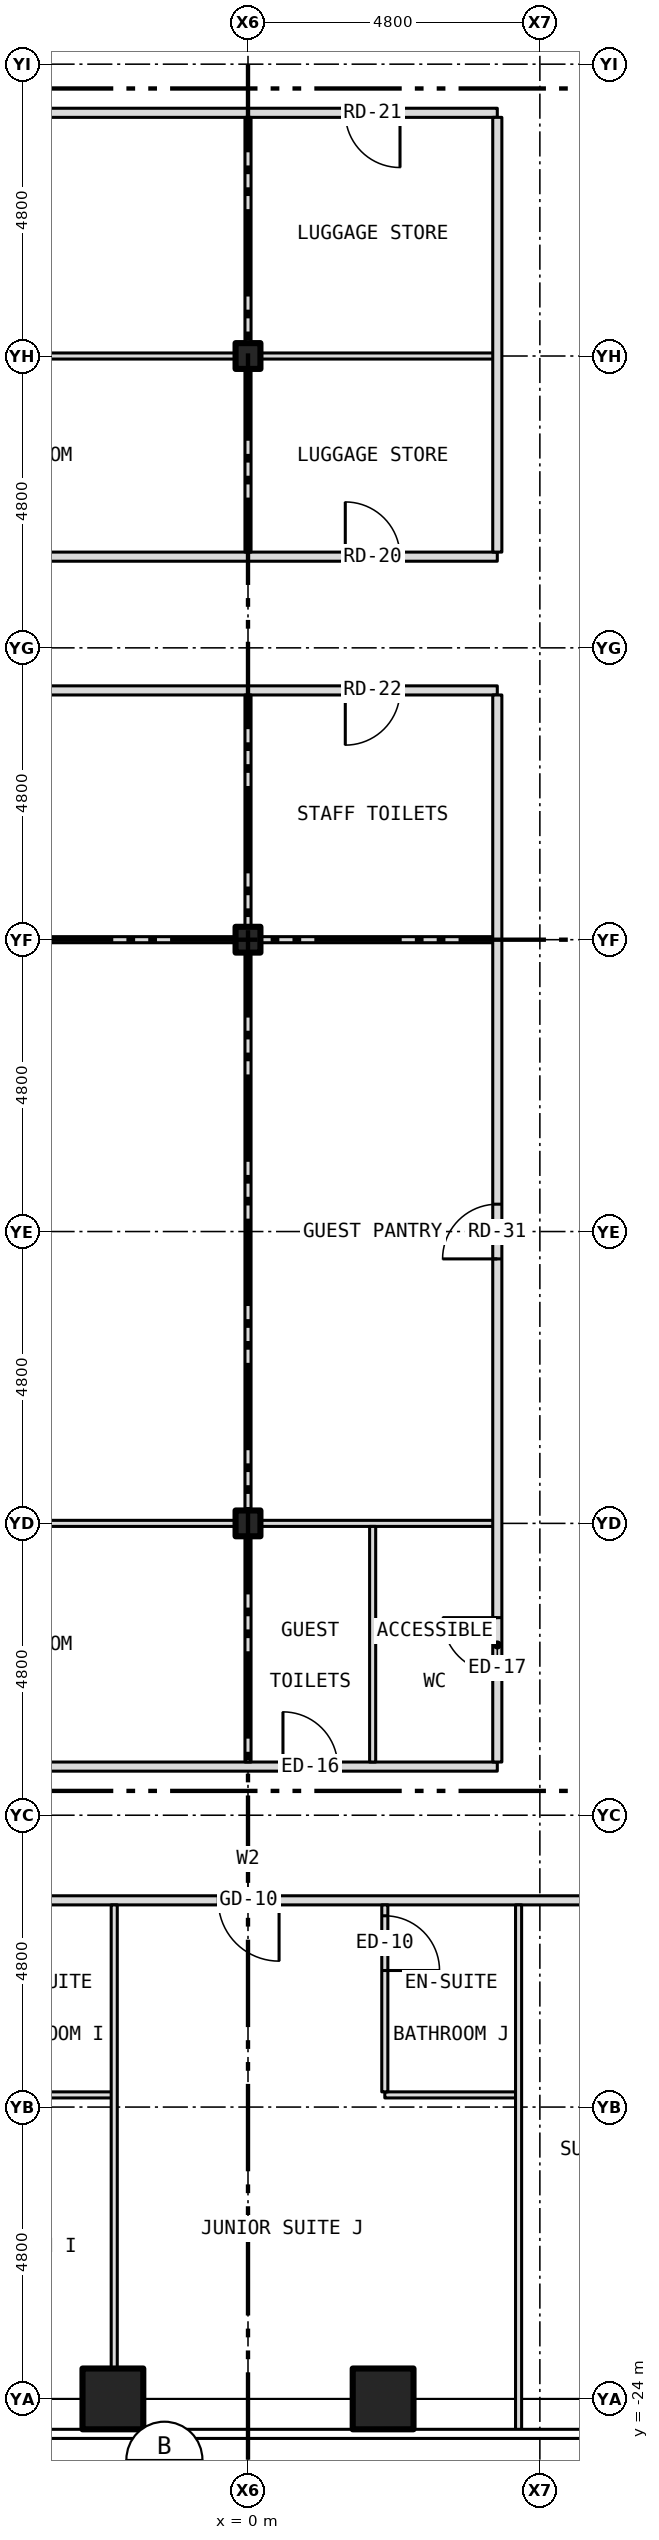
"""IFC4 building model, lengths in metres.
Left out: names, types, materials, properties, quantities, classifications, styles, units other than length and angle.
Written with IfcOpenShell. Run it as: python <this file> out.ifc"""

import sys

from ifc_helpers import new_model, si_unit, direction, frame, frame_2d, origin, origin_2d, place, context, subcontext, project, spatial, rectangle, hollow_rectangle, i_section, extrude, element, fill, save


model = new_model("IFC4")
c1 = context("Model", 3, precision=1e-05, world=origin(), true_north=direction((0.0, 1.0)))
c2 = subcontext(c1, "Body", "Model", "MODEL_VIEW")
j1 = project(units=[si_unit("LENGTHUNIT", "METRE"), si_unit("PLANEANGLEUNIT", "RADIAN")], contexts=[c1])
p1 = place(None, origin())
s1 = spatial("IfcSite", under=j1, at=p1, CompositionType="ELEMENT")
p2 = place(p1, origin())
s2 = spatial("IfcBuilding", under=s1, at=p2, CompositionType="ELEMENT")
p3 = place(p2, frame((0.0, 0.0, 49.5)))
s3 = spatial("IfcBuildingStorey", under=s2, at=p3, CompositionType="ELEMENT", Elevation=49.5)
for number, where, z_axis, x_axis in (
    (1, (-2.222, -24.0, -0.15), (0.0, 0.0, 1.0), (1.0, 0.0, 0.0)),
    (2, (2.222, -24.0, -0.15), (0.0, 0.0, 1.0), (1.0, 0.0, 0.0)),
):
    element("IfcColumn", number, at=place(p3, frame(where, z_axis=z_axis, x_axis=x_axis)), inside=s3, PredefinedType="COLUMN", context=c2, shape_type="SweptSolid", body=[
        extrude(hollow_rectangle(XDim=1.0, YDim=1.0, WallThickness=0.06, at=origin_2d()), origin(), (0.0, 0.0, 1.0), 3.5),
    ])
for number, where, z_axis, x_axis in (
    (3, (0.0, -9.6, -0.15), (0.0, 0.0, 1.0), (1.0, 0.0, 0.0)),
    (4, (0.0, 0.0, -0.15), (0.0, 0.0, 1.0), (1.0, 0.0, 0.0)),
    (5, (0.0, 9.6, -0.15), (0.0, 0.0, 1.0), (1.0, 0.0, 0.0)),
):
    element("IfcColumn", number, at=place(p3, frame(where, z_axis=z_axis, x_axis=x_axis)), inside=s3, PredefinedType="COLUMN", context=c2, shape_type="SweptSolid", body=[
        extrude(i_section(OverallWidth=0.409, OverallDepth=0.424, WebThickness=0.033, FlangeThickness=0.052, at=origin_2d()), origin(), (0.0, 0.0, 1.0), 3.5),
    ])
for number, where, z_axis, x_axis in (
    (6, (-4.4, -19.0, 0.0), (0.0, 0.0, 1.0), (1.0, 0.0, 0.0)),
    (7, (2.25, -19.0, 0.0), (0.0, 0.0, 1.0), (1.0, 0.0, 0.0)),
):
    element("IfcWall", number, at=place(p3, frame(where, z_axis=z_axis, x_axis=x_axis)), inside=s3, PredefinedType="PARTITIONING", context=c2, shape_type="SweptSolid", body=[
        extrude(rectangle(XDim=2.2, YDim=0.1, at=frame_2d((1.1, 0.0))), origin(), (0.0, 0.0, 1.0), 3.35),
    ])
p4 = place(p3, frame((-15.8, -15.8, 0.0), z_axis=(0.0, 0.0, 1.0), x_axis=(1.0, 0.0, 0.0)))
e8 = element("IfcWall", 8, at=p4, inside=s3, PredefinedType="PARTITIONING", context=c2, shape_type="SweptSolid", body=[
    extrude(rectangle(XDim=31.6, YDim=0.15, at=frame_2d((15.8, 0.0))), origin(), (0.0, 0.0, 1.0), 3.35),
])
p5 = place(p4, frame((3.067, 0.0, 0.0)))
e9 = element("IfcOpeningElement", 9, at=p5, cuts=e8, PredefinedType="OPENING", context=c2, shape_type="SweptSolid", body=[
    extrude(rectangle(XDim=1.0, YDim=2.1, at=frame_2d((0.5, 1.05))), frame((0.0, 0.087, 0.0), z_axis=(0.0, -1.0, 0.0), x_axis=(1.0, 0.0, 0.0)), (0.0, 0.0, 1.0), 0.174),
])
p6 = place(p4, frame((5.311, 0.0, 0.0)))
e10 = element("IfcOpeningElement", 10, at=p6, cuts=e8, PredefinedType="OPENING", context=c2, shape_type="SweptSolid", body=[
    extrude(rectangle(XDim=1.0, YDim=2.1, at=frame_2d((0.5, 1.05))), frame((0.0, 0.087, 0.0), z_axis=(0.0, -1.0, 0.0), x_axis=(1.0, 0.0, 0.0)), (0.0, 0.0, 1.0), 0.174),
])
p7 = place(p4, frame((9.756, 0.0, 0.0)))
e11 = element("IfcOpeningElement", 11, at=p7, cuts=e8, PredefinedType="OPENING", context=c2, shape_type="SweptSolid", body=[
    extrude(rectangle(XDim=1.0, YDim=2.1, at=frame_2d((0.5, 1.05))), frame((0.0, 0.087, 0.0), z_axis=(0.0, -1.0, 0.0), x_axis=(1.0, 0.0, 0.0)), (0.0, 0.0, 1.0), 0.174),
])
p8 = place(p4, frame((15.311, 0.0, 0.0)))
e12 = element("IfcOpeningElement", 12, at=p8, cuts=e8, PredefinedType="OPENING", context=c2, shape_type="SweptSolid", body=[
    extrude(rectangle(XDim=1.0, YDim=2.1, at=frame_2d((0.5, 1.05))), frame((0.0, 0.087, 0.0), z_axis=(0.0, -1.0, 0.0), x_axis=(1.0, 0.0, 0.0)), (0.0, 0.0, 1.0), 0.174),
])
p9 = place(p4, frame((22.245, 0.0, 0.0)))
e13 = element("IfcOpeningElement", 13, at=p9, cuts=e8, PredefinedType="OPENING", context=c2, shape_type="SweptSolid", body=[
    extrude(rectangle(XDim=1.0, YDim=2.1, at=frame_2d((0.5, 1.05))), frame((0.0, 0.087, 0.0), z_axis=(0.0, -1.0, 0.0), x_axis=(1.0, 0.0, 0.0)), (0.0, 0.0, 1.0), 0.174),
])
p10 = place(p3, frame((-12.8, -13.6, 0.0), z_axis=(0.0, 0.0, 1.0), x_axis=(1.0, 0.0, 0.0)))
e14 = element("IfcWall", 14, at=p10, inside=s3, PredefinedType="PARTITIONING", context=c2, shape_type="SweptSolid", body=[
    extrude(rectangle(XDim=16.9, YDim=0.15, at=frame_2d((8.45, 0.0))), origin(), (0.0, 0.0, 1.0), 3.35),
])
p11 = place(p10, frame((1.15, 0.0, 0.0)))
e15 = element("IfcOpeningElement", 15, at=p11, cuts=e14, PredefinedType="OPENING", context=c2, shape_type="SweptSolid", body=[
    extrude(rectangle(XDim=0.9, YDim=2.1, at=frame_2d((0.45, 1.05))), frame((0.0, 0.087, 0.0), z_axis=(0.0, -1.0, 0.0), x_axis=(1.0, 0.0, 0.0)), (0.0, 0.0, 1.0), 0.174),
])
p12 = place(p10, frame((13.375, 0.0, 0.0)))
e16 = element("IfcOpeningElement", 16, at=p12, cuts=e14, PredefinedType="OPENING", context=c2, shape_type="SweptSolid", body=[
    extrude(rectangle(XDim=0.9, YDim=2.1, at=frame_2d((0.45, 1.05))), frame((0.0, 0.087, 0.0), z_axis=(0.0, -1.0, 0.0), x_axis=(1.0, 0.0, 0.0)), (0.0, 0.0, 1.0), 0.174),
])
p13 = place(p10, frame((7.55, 0.0, 0.0)))
e17 = element("IfcOpeningElement", 17, at=p13, cuts=e14, PredefinedType="OPENING", context=c2, shape_type="SweptSolid", body=[
    extrude(rectangle(XDim=0.9, YDim=2.1, at=frame_2d((0.45, 1.05))), frame((0.0, 0.087, 0.0), z_axis=(0.0, -1.0, 0.0), x_axis=(1.0, 0.0, 0.0)), (0.0, 0.0, 1.0), 0.174),
])
p14 = place(p3, frame((-9.396, -9.6, 0.0), z_axis=(0.0, 0.0, 1.0), x_axis=(1.0, 0.0, 0.0)))
e18 = element("IfcWall", 18, at=p14, inside=s3, PredefinedType="PARTITIONING", context=c2, shape_type="SweptSolid", body=[
    extrude(rectangle(XDim=9.192, YDim=0.1, at=frame_2d((4.596, 0.0))), origin(), (0.0, 0.0, 1.0), 2.728),
])
p15 = place(p3, frame((-0.204, -9.6, 0.0), z_axis=(0.0, 0.0, 1.0), x_axis=(1.0, 0.0, 0.0)))
e19 = element("IfcWall", 19, at=p15, inside=s3, PredefinedType="PARTITIONING", context=c2, shape_type="SweptSolid", body=[
    extrude(rectangle(XDim=0.408, YDim=0.1, at=frame_2d((0.204, 0.0))), origin(), (0.0, 0.0, 1.0), 3.35),
])
p16 = place(p3, frame((0.204, -9.6, 0.0), z_axis=(0.0, 0.0, 1.0), x_axis=(1.0, 0.0, 0.0)))
e20 = element("IfcWall", 20, at=p16, inside=s3, PredefinedType="PARTITIONING", context=c2, shape_type="SweptSolid", body=[
    extrude(rectangle(XDim=3.896, YDim=0.1, at=frame_2d((1.948, 0.0))), origin(), (0.0, 0.0, 1.0), 2.728),
])
p17 = place(p3, frame((-9.396, 0.0, 0.0), z_axis=(0.0, 0.0, 1.0), x_axis=(1.0, 0.0, 0.0)))
e21 = element("IfcWall", 21, at=p17, inside=s3, PredefinedType="PARTITIONING", context=c2, shape_type="SweptSolid", body=[
    extrude(rectangle(XDim=9.192, YDim=0.1, at=frame_2d((4.596, 0.0))), origin(), (0.0, 0.0, 1.0), 2.728),
])
p18 = place(p3, frame((-0.204, 0.0, 0.0), z_axis=(0.0, 0.0, 1.0), x_axis=(1.0, 0.0, 0.0)))
e22 = element("IfcWall", 22, at=p18, inside=s3, PredefinedType="PARTITIONING", context=c2, shape_type="SweptSolid", body=[
    extrude(rectangle(XDim=0.408, YDim=0.1, at=frame_2d((0.204, 0.0))), origin(), (0.0, 0.0, 1.0), 3.35),
])
p19 = place(p3, frame((0.204, 0.0, 0.0), z_axis=(0.0, 0.0, 1.0), x_axis=(1.0, 0.0, 0.0)))
e23 = element("IfcWall", 23, at=p19, inside=s3, PredefinedType="PARTITIONING", context=c2, shape_type="SweptSolid", body=[
    extrude(rectangle(XDim=3.896, YDim=0.1, at=frame_2d((1.948, 0.0))), origin(), (0.0, 0.0, 1.0), 2.728),
])
p20 = place(p3, frame((-12.8, 4.1, 0.0), z_axis=(0.0, 0.0, 1.0), x_axis=(1.0, 0.0, 0.0)))
e24 = element("IfcWall", 24, at=p20, inside=s3, PredefinedType="PARTITIONING", context=c2, shape_type="SweptSolid", body=[
    extrude(rectangle(XDim=16.9, YDim=0.15, at=frame_2d((8.45, 0.0))), origin(), (0.0, 0.0, 1.0), 3.35),
])
p21 = place(p20, frame((1.15, 0.0, 0.0)))
e25 = element("IfcOpeningElement", 25, at=p21, cuts=e24, PredefinedType="OPENING", context=c2, shape_type="SweptSolid", body=[
    extrude(rectangle(XDim=0.9, YDim=2.1, at=frame_2d((0.45, 1.05))), frame((0.0, 0.087, 0.0), z_axis=(0.0, -1.0, 0.0), x_axis=(1.0, 0.0, 0.0)), (0.0, 0.0, 1.0), 0.174),
])
p22 = place(p20, frame((14.4, 0.0, 0.0)))
e26 = element("IfcOpeningElement", 26, at=p22, cuts=e24, PredefinedType="OPENING", context=c2, shape_type="SweptSolid", body=[
    extrude(rectangle(XDim=0.9, YDim=2.1, at=frame_2d((0.45, 1.05))), frame((0.0, 0.087, 0.0), z_axis=(0.0, -1.0, 0.0), x_axis=(1.0, 0.0, 0.0)), (0.0, 0.0, 1.0), 0.174),
])
p23 = place(p20, frame((7.55, 0.0, 0.0)))
e27 = element("IfcOpeningElement", 27, at=p23, cuts=e24, PredefinedType="OPENING", context=c2, shape_type="SweptSolid", body=[
    extrude(rectangle(XDim=0.9, YDim=2.1, at=frame_2d((0.45, 1.05))), frame((0.0, 0.087, 0.0), z_axis=(0.0, -1.0, 0.0), x_axis=(1.0, 0.0, 0.0)), (0.0, 0.0, 1.0), 0.174),
])
p24 = place(p3, frame((-12.8, 6.3, 0.0), z_axis=(0.0, 0.0, 1.0), x_axis=(1.0, 0.0, 0.0)))
e28 = element("IfcWall", 28, at=p24, inside=s3, PredefinedType="PARTITIONING", context=c2, shape_type="SweptSolid", body=[
    extrude(rectangle(XDim=16.9, YDim=0.15, at=frame_2d((8.45, 0.0))), origin(), (0.0, 0.0, 1.0), 3.35),
])
p25 = place(p24, frame((14.4, 0.0, 0.0)))
e29 = element("IfcOpeningElement", 29, at=p25, cuts=e28, PredefinedType="OPENING", context=c2, shape_type="SweptSolid", body=[
    extrude(rectangle(XDim=0.9, YDim=2.1, at=frame_2d((0.45, 1.05))), frame((0.0, 0.087, 0.0), z_axis=(0.0, -1.0, 0.0), x_axis=(1.0, 0.0, 0.0)), (0.0, 0.0, 1.0), 0.174),
])
p26 = place(p24, frame((7.55, 0.0, 0.0)))
e30 = element("IfcOpeningElement", 30, at=p26, cuts=e28, PredefinedType="OPENING", context=c2, shape_type="SweptSolid", body=[
    extrude(rectangle(XDim=0.9, YDim=2.1, at=frame_2d((0.45, 1.05))), frame((0.0, 0.087, 0.0), z_axis=(0.0, -1.0, 0.0), x_axis=(1.0, 0.0, 0.0)), (0.0, 0.0, 1.0), 0.174),
])
p27 = place(p3, frame((-9.396, 9.6, 0.0), z_axis=(0.0, 0.0, 1.0), x_axis=(1.0, 0.0, 0.0)))
e31 = element("IfcWall", 31, at=p27, inside=s3, PredefinedType="PARTITIONING", context=c2, shape_type="SweptSolid", body=[
    extrude(rectangle(XDim=9.192, YDim=0.1, at=frame_2d((4.596, 0.0))), origin(), (0.0, 0.0, 1.0), 2.728),
])
p28 = place(p3, frame((-0.204, 9.6, 0.0), z_axis=(0.0, 0.0, 1.0), x_axis=(1.0, 0.0, 0.0)))
e32 = element("IfcWall", 32, at=p28, inside=s3, PredefinedType="PARTITIONING", context=c2, shape_type="SweptSolid", body=[
    extrude(rectangle(XDim=0.408, YDim=0.1, at=frame_2d((0.204, 0.0))), origin(), (0.0, 0.0, 1.0), 3.35),
])
p29 = place(p3, frame((0.204, 9.6, 0.0), z_axis=(0.0, 0.0, 1.0), x_axis=(1.0, 0.0, 0.0)))
e33 = element("IfcWall", 33, at=p29, inside=s3, PredefinedType="PARTITIONING", context=c2, shape_type="SweptSolid", body=[
    extrude(rectangle(XDim=3.896, YDim=0.1, at=frame_2d((1.948, 0.0))), origin(), (0.0, 0.0, 1.0), 2.728),
])
p30 = place(p3, frame((-12.8, 13.6, 0.0), z_axis=(0.0, 0.0, 1.0), x_axis=(1.0, 0.0, 0.0)))
e34 = element("IfcWall", 34, at=p30, inside=s3, PredefinedType="PARTITIONING", context=c2, shape_type="SweptSolid", body=[
    extrude(rectangle(XDim=16.9, YDim=0.15, at=frame_2d((8.45, 0.0))), origin(), (0.0, 0.0, 1.0), 3.35),
])
p31 = place(p30, frame((1.15, 0.0, 0.0)))
e35 = element("IfcOpeningElement", 35, at=p31, cuts=e34, PredefinedType="OPENING", context=c2, shape_type="SweptSolid", body=[
    extrude(rectangle(XDim=0.9, YDim=2.1, at=frame_2d((0.45, 1.05))), frame((0.0, 0.087, 0.0), z_axis=(0.0, -1.0, 0.0), x_axis=(1.0, 0.0, 0.0)), (0.0, 0.0, 1.0), 0.174),
])
p32 = place(p30, frame((14.4, 0.0, 0.0)))
e36 = element("IfcOpeningElement", 36, at=p32, cuts=e34, PredefinedType="OPENING", context=c2, shape_type="SweptSolid", body=[
    extrude(rectangle(XDim=0.9, YDim=2.1, at=frame_2d((0.45, 1.05))), frame((0.0, 0.087, 0.0), z_axis=(0.0, -1.0, 0.0), x_axis=(1.0, 0.0, 0.0)), (0.0, 0.0, 1.0), 0.174),
])
p33 = place(p30, frame((7.55, 0.0, 0.0)))
e37 = element("IfcOpeningElement", 37, at=p33, cuts=e34, PredefinedType="OPENING", context=c2, shape_type="SweptSolid", body=[
    extrude(rectangle(XDim=0.9, YDim=2.1, at=frame_2d((0.45, 1.05))), frame((0.0, 0.087, 0.0), z_axis=(0.0, -1.0, 0.0), x_axis=(1.0, 0.0, 0.0)), (0.0, 0.0, 1.0), 0.174),
])
p34 = place(p3, frame((-2.2, -23.88, 0.0), z_axis=(0.0, 0.0, 1.0), x_axis=(0.0, 1.0, 0.0)))
e38 = element("IfcWall", 38, at=p34, inside=s3, PredefinedType="PARTITIONING", context=c2, shape_type="SweptSolid", body=[
    extrude(rectangle(XDim=8.005, YDim=0.1, at=frame_2d((4.002, 0.0))), origin(), (0.0, 0.0, 1.0), 3.35),
])
p35 = place(p3, frame((0.0, -13.525, 0.0), z_axis=(0.0, 0.0, 1.0), x_axis=(0.0, 1.0, 0.0)))
e39 = element("IfcWall", 39, at=p35, inside=s3, PredefinedType="PARTITIONING", context=c2, shape_type="SweptSolid", body=[
    extrude(rectangle(XDim=3.875, YDim=0.1, at=frame_2d((1.938, 0.0))), origin(), (0.0, 0.0, 1.0), 2.728),
])
p36 = place(p3, frame((0.0, -9.55, 0.0), z_axis=(0.0, 0.0, 1.0), x_axis=(0.0, 1.0, 0.0)))
e40 = element("IfcWall", 40, at=p36, inside=s3, PredefinedType="PARTITIONING", context=c2, shape_type="SweptSolid", body=[
    extrude(rectangle(XDim=9.5, YDim=0.1, at=frame_2d((4.75, 0.0))), origin(), (0.0, 0.0, 1.0), 2.728),
])
p37 = place(p3, frame((0.0, 0.05, 0.0), z_axis=(0.0, 0.0, 1.0), x_axis=(0.0, 1.0, 0.0)))
e41 = element("IfcWall", 41, at=p37, inside=s3, PredefinedType="PARTITIONING", context=c2, shape_type="SweptSolid", body=[
    extrude(rectangle(XDim=3.975, YDim=0.1, at=frame_2d((1.987, 0.0))), origin(), (0.0, 0.0, 1.0), 2.728),
])
p38 = place(p3, frame((0.0, 6.375, 0.0), z_axis=(0.0, 0.0, 1.0), x_axis=(0.0, 1.0, 0.0)))
e42 = element("IfcWall", 42, at=p38, inside=s3, PredefinedType="PARTITIONING", context=c2, shape_type="SweptSolid", body=[
    extrude(rectangle(XDim=3.175, YDim=0.1, at=frame_2d((1.587, 0.0))), origin(), (0.0, 0.0, 1.0), 2.728),
])
p39 = place(p3, frame((0.0, 9.65, 0.0), z_axis=(0.0, 0.0, 1.0), x_axis=(0.0, 1.0, 0.0)))
e43 = element("IfcWall", 43, at=p39, inside=s3, PredefinedType="PARTITIONING", context=c2, shape_type="SweptSolid", body=[
    extrude(rectangle(XDim=3.875, YDim=0.1, at=frame_2d((1.938, 0.0))), origin(), (0.0, 0.0, 1.0), 2.728),
])
p40 = place(p3, frame((2.05, -13.525, 0.0), z_axis=(0.0, 0.0, 1.0), x_axis=(0.0, 1.0, 0.0)))
e44 = element("IfcWall", 44, at=p40, inside=s3, PredefinedType="PARTITIONING", context=c2, shape_type="SweptSolid", body=[
    extrude(rectangle(XDim=3.875, YDim=0.1, at=frame_2d((1.938, 0.0))), origin(), (0.0, 0.0, 1.0), 3.35),
])
p41 = place(p3, frame((2.25, -18.95, 0.0), z_axis=(0.0, 0.0, 1.0), x_axis=(0.0, 1.0, 0.0)))
e45 = element("IfcWall", 45, at=p41, inside=s3, PredefinedType="PARTITIONING", context=c2, shape_type="SweptSolid", body=[
    extrude(rectangle(XDim=3.075, YDim=0.1, at=frame_2d((1.538, 0.0))), origin(), (0.0, 0.0, 1.0), 3.35),
])
p42 = place(p41, frame((1.996, 0.0, 0.0)))
e46 = element("IfcOpeningElement", 46, at=p42, cuts=e45, PredefinedType="OPENING", context=c2, shape_type="SweptSolid", body=[
    extrude(rectangle(XDim=0.9, YDim=2.1, at=frame_2d((0.45, 1.05))), frame((0.0, 0.062, 0.0), z_axis=(0.0, -1.0, 0.0), x_axis=(1.0, 0.0, 0.0)), (0.0, 0.0, 1.0), 0.124),
])
p43 = place(p3, frame((4.1, -13.525, 0.0), z_axis=(0.0, 0.0, 1.0), x_axis=(0.0, 1.0, 0.0)))
e47 = element("IfcWall", 47, at=p43, inside=s3, PredefinedType="PARTITIONING", context=c2, shape_type="SweptSolid", body=[
    extrude(rectangle(XDim=17.55, YDim=0.15, at=frame_2d((8.775, 0.0))), origin(), (0.0, 0.0, 1.0), 3.35),
])
p44 = place(p43, frame((1.475, 0.0, 0.0)))
e48 = element("IfcOpeningElement", 48, at=p44, cuts=e47, PredefinedType="OPENING", context=c2, shape_type="SweptSolid", body=[
    extrude(rectangle(XDim=0.9, YDim=2.1, at=frame_2d((0.45, 1.05))), frame((0.0, 0.087, 0.0), z_axis=(0.0, -1.0, 0.0), x_axis=(1.0, 0.0, 0.0)), (0.0, 0.0, 1.0), 0.174),
])
p45 = place(p43, frame((8.275, 0.0, 0.0)))
e49 = element("IfcOpeningElement", 49, at=p45, cuts=e47, PredefinedType="OPENING", context=c2, shape_type="SweptSolid", body=[
    extrude(rectangle(XDim=0.9, YDim=2.1, at=frame_2d((0.45, 1.05))), frame((0.0, 0.087, 0.0), z_axis=(0.0, -1.0, 0.0), x_axis=(1.0, 0.0, 0.0)), (0.0, 0.0, 1.0), 0.174),
])
p46 = place(p3, frame((4.1, 6.375, 0.0), z_axis=(0.0, 0.0, 1.0), x_axis=(0.0, 1.0, 0.0)))
e50 = element("IfcWall", 50, at=p46, inside=s3, PredefinedType="PARTITIONING", context=c2, shape_type="SweptSolid", body=[
    extrude(rectangle(XDim=7.15, YDim=0.15, at=frame_2d((3.575, 0.0))), origin(), (0.0, 0.0, 1.0), 3.35),
])
p47 = place(p3, frame((4.45, -24.53, 0.0), z_axis=(0.0, 0.0, 1.0), x_axis=(0.0, 1.0, 0.0)))
e51 = element("IfcWall", 51, at=p47, inside=s3, PredefinedType="PARTITIONING", context=c2, shape_type="SweptSolid", body=[
    extrude(rectangle(XDim=8.655, YDim=0.1, at=frame_2d((4.328, 0.0))), origin(), (0.0, 0.0, 1.0), 3.35),
])
p48 = place(p8, origin())
e52 = element("IfcDoor", 52, at=p48, inside=s3, OperationType="SINGLE_SWING_RIGHT", PredefinedType="DOOR", context=c2, shape_type="SweptSolid", body=[
    extrude(rectangle(XDim=1.0, YDim=2.1, at=frame_2d((0.5, 1.05))), frame((0.0, 0.025, 0.0), z_axis=(0.0, -1.0, 0.0), x_axis=(1.0, 0.0, 0.0)), (0.0, 0.0, 1.0), 0.05),
])
fill(e12, e52)
p49 = place(p42, origin())
e53 = element("IfcDoor", 53, at=p49, inside=s3, OperationType="SINGLE_SWING_LEFT", PredefinedType="DOOR", context=c2, shape_type="SweptSolid", body=[
    extrude(rectangle(XDim=0.9, YDim=2.1, at=frame_2d((0.45, 1.05))), frame((0.0, 0.025, 0.0), z_axis=(0.0, -1.0, 0.0), x_axis=(1.0, 0.0, 0.0)), (0.0, 0.0, 1.0), 0.05),
])
fill(e46, e53)
p50 = place(p25, origin())
e54 = element("IfcDoor", 54, at=p50, inside=s3, OperationType="SINGLE_SWING_LEFT", PredefinedType="DOOR", context=c2, shape_type="SweptSolid", body=[
    extrude(rectangle(XDim=0.9, YDim=2.1, at=frame_2d((0.45, 1.05))), frame((0.0, 0.025, 0.0), z_axis=(0.0, -1.0, 0.0), x_axis=(1.0, 0.0, 0.0)), (0.0, 0.0, 1.0), 0.05),
])
fill(e29, e54)
p51 = place(p12, origin())
e55 = element("IfcDoor", 55, at=p51, inside=s3, OperationType="SINGLE_SWING_LEFT", PredefinedType="DOOR", context=c2, shape_type="SweptSolid", body=[
    extrude(rectangle(XDim=0.9, YDim=2.1, at=frame_2d((0.45, 1.05))), frame((0.0, 0.025, 0.0), z_axis=(0.0, -1.0, 0.0), x_axis=(1.0, 0.0, 0.0)), (0.0, 0.0, 1.0), 0.05),
])
fill(e16, e55)
p52 = place(p44, origin())
e56 = element("IfcDoor", 56, at=p52, inside=s3, OperationType="SINGLE_SWING_RIGHT", PredefinedType="DOOR", context=c2, shape_type="SweptSolid", body=[
    extrude(rectangle(XDim=0.9, YDim=2.1, at=frame_2d((0.45, 1.05))), frame((0.0, 0.025, 0.0), z_axis=(0.0, -1.0, 0.0), x_axis=(1.0, 0.0, 0.0)), (0.0, 0.0, 1.0), 0.05),
])
fill(e48, e56)
p53 = place(p32, origin())
e57 = element("IfcDoor", 57, at=p53, inside=s3, OperationType="SINGLE_SWING_RIGHT", PredefinedType="DOOR", context=c2, shape_type="SweptSolid", body=[
    extrude(rectangle(XDim=0.9, YDim=2.1, at=frame_2d((0.45, 1.05))), frame((0.0, 0.025, 0.0), z_axis=(0.0, -1.0, 0.0), x_axis=(1.0, 0.0, 0.0)), (0.0, 0.0, 1.0), 0.05),
])
fill(e36, e57)
p54 = place(p22, origin())
e58 = element("IfcDoor", 58, at=p54, inside=s3, OperationType="SINGLE_SWING_LEFT", PredefinedType="DOOR", context=c2, shape_type="SweptSolid", body=[
    extrude(rectangle(XDim=0.9, YDim=2.1, at=frame_2d((0.45, 1.05))), frame((0.0, 0.025, 0.0), z_axis=(0.0, -1.0, 0.0), x_axis=(1.0, 0.0, 0.0)), (0.0, 0.0, 1.0), 0.05),
])
fill(e26, e58)
p55 = place(p45, origin())
e59 = element("IfcDoor", 59, at=p55, inside=s3, OperationType="SINGLE_SWING_LEFT", PredefinedType="DOOR", context=c2, shape_type="SweptSolid", body=[
    extrude(rectangle(XDim=0.9, YDim=2.1, at=frame_2d((0.45, 1.05))), frame((0.0, 0.025, 0.0), z_axis=(0.0, -1.0, 0.0), x_axis=(1.0, 0.0, 0.0)), (0.0, 0.0, 1.0), 0.05),
])
fill(e49, e59)
save(model, sys.argv[1])
